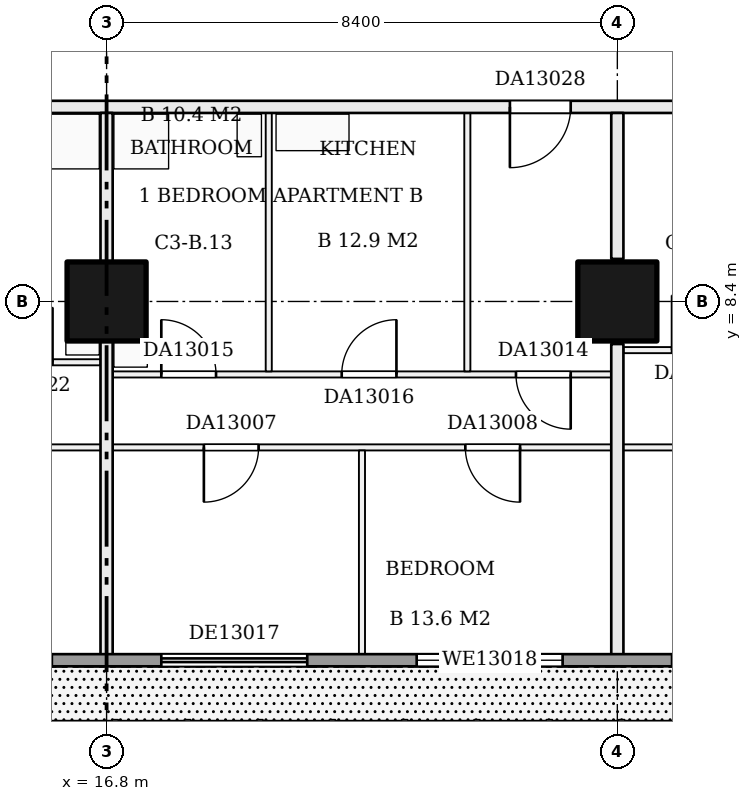
"""IFC4 building model, lengths in metres.
Left out: names, types, materials, properties, quantities, classifications, styles, units other than length and angle.
Written with IfcOpenShell. Run it as: python <this file> out.ifc"""

import sys

from ifc_helpers import new_model, si_unit, direction, frame, frame_2d, origin, origin_2d, place, context, subcontext, project, spatial, rectangle, extrude, element, fill, save


model = new_model("IFC4")
c1 = context("Model", 3, precision=1e-05, world=origin(), true_north=direction((0.0, 1.0)))
c2 = subcontext(c1, "Body", "Model", "MODEL_VIEW")
j1 = project(units=[si_unit("LENGTHUNIT", "METRE"), si_unit("PLANEANGLEUNIT", "RADIAN")], contexts=[c1])
p1 = place(None, origin())
s1 = spatial("IfcSite", under=j1, at=p1, CompositionType="ELEMENT")
p2 = place(p1, origin())
s2 = spatial("IfcBuilding", under=s1, at=p2, CompositionType="ELEMENT")
p3 = place(p2, frame((0.0, 0.0, 56.7)))
s3 = spatial("IfcBuildingStorey", under=s2, at=p3, CompositionType="ELEMENT", Elevation=56.7)
for number, where, z_axis, x_axis in (
    (1, (16.8, 8.4, 0.0), (0.0, 0.0, 1.0), (1.0, 0.0, 0.0)),
    (2, (25.2, 8.4, 0.0), (0.0, 0.0, 1.0), (1.0, 0.0, 0.0)),
):
    element("IfcColumn", number, at=place(p3, frame(where, z_axis=z_axis, x_axis=x_axis)), inside=s3, PredefinedType="COLUMN", context=c2, shape_type="SweptSolid", body=[
        extrude(rectangle(XDim=1.3, YDim=1.3, at=origin_2d()), origin(), (0.0, 0.0, 1.0), 3.22),
    ])
p4 = place(p3, frame((8.45, 6.0, 0.0), z_axis=(0.0, 0.0, 1.0), x_axis=(1.0, 0.0, 0.0)))
e3 = element("IfcWall", 3, at=p4, inside=s3, PredefinedType="PARTITIONING", context=c2, shape_type="SweptSolid", body=[
    extrude(rectangle(XDim=29.25, YDim=0.1, at=frame_2d((14.625, 0.0))), origin(), (0.0, 0.0, 1.0), 3.22),
])
p5 = place(p4, frame((3.75, 0.0, 0.0)))
e4 = element("IfcOpeningElement", 4, at=p5, cuts=e3, PredefinedType="OPENING", context=c2, shape_type="SweptSolid", body=[
    extrude(rectangle(XDim=0.9, YDim=2.1, at=frame_2d((0.45, 1.05))), frame((0.0, 0.06, 0.0), z_axis=(0.0, -1.0, 0.0), x_axis=(1.0, 0.0, 0.0)), (0.0, 0.0, 1.0), 0.12),
])
p6 = place(p4, frame((9.95, 0.0, 0.0)))
e5 = element("IfcOpeningElement", 5, at=p6, cuts=e3, PredefinedType="OPENING", context=c2, shape_type="SweptSolid", body=[
    extrude(rectangle(XDim=0.9, YDim=2.1, at=frame_2d((0.45, 1.05))), frame((0.0, 0.06, 0.0), z_axis=(0.0, -1.0, 0.0), x_axis=(1.0, 0.0, 0.0)), (0.0, 0.0, 1.0), 0.12),
])
p7 = place(p4, frame((14.25, 0.0, 0.0)))
e6 = element("IfcOpeningElement", 6, at=p7, cuts=e3, PredefinedType="OPENING", context=c2, shape_type="SweptSolid", body=[
    extrude(rectangle(XDim=0.9, YDim=2.1, at=frame_2d((0.45, 1.05))), frame((0.0, 0.06, 0.0), z_axis=(0.0, -1.0, 0.0), x_axis=(1.0, 0.0, 0.0)), (0.0, 0.0, 1.0), 0.12),
])
p8 = place(p4, frame((20.45, 0.0, 0.0)))
e7 = element("IfcOpeningElement", 7, at=p8, cuts=e3, PredefinedType="OPENING", context=c2, shape_type="SweptSolid", body=[
    extrude(rectangle(XDim=0.9, YDim=2.1, at=frame_2d((0.45, 1.05))), frame((0.0, 0.06, 0.0), z_axis=(0.0, -1.0, 0.0), x_axis=(1.0, 0.0, 0.0)), (0.0, 0.0, 1.0), 0.12),
])
p9 = place(p4, frame((26.75, 0.0, 0.0)))
e8 = element("IfcOpeningElement", 8, at=p9, cuts=e3, PredefinedType="OPENING", context=c2, shape_type="SweptSolid", body=[
    extrude(rectangle(XDim=0.9, YDim=2.1, at=frame_2d((0.45, 1.05))), frame((0.0, 0.06, 0.0), z_axis=(0.0, -1.0, 0.0), x_axis=(1.0, 0.0, 0.0)), (0.0, 0.0, 1.0), 0.12),
])
p10 = place(p3, frame((16.9, 7.2, 0.0), z_axis=(0.0, 0.0, 1.0), x_axis=(1.0, 0.0, 0.0)))
e9 = element("IfcWall", 9, at=p10, inside=s3, PredefinedType="PARTITIONING", context=c2, shape_type="SweptSolid", body=[
    extrude(rectangle(XDim=8.2, YDim=0.1, at=frame_2d((4.1, 0.0))), origin(), (0.0, 0.0, 1.0), 3.22),
])
p11 = place(p10, frame((6.633, 0.0, 0.0)))
e10 = element("IfcOpeningElement", 10, at=p11, cuts=e9, PredefinedType="OPENING", context=c2, shape_type="SweptSolid", body=[
    extrude(rectangle(XDim=0.9, YDim=2.1, at=frame_2d((0.45, 1.05))), frame((0.0, 0.06, 0.0), z_axis=(0.0, -1.0, 0.0), x_axis=(1.0, 0.0, 0.0)), (0.0, 0.0, 1.0), 0.12),
])
p12 = place(p10, frame((0.8, 0.0, 0.0)))
e11 = element("IfcOpeningElement", 11, at=p12, cuts=e9, PredefinedType="OPENING", context=c2, shape_type="SweptSolid", body=[
    extrude(rectangle(XDim=0.9, YDim=2.1, at=frame_2d((0.45, 1.05))), frame((0.0, 0.06, 0.0), z_axis=(0.0, -1.0, 0.0), x_axis=(1.0, 0.0, 0.0)), (0.0, 0.0, 1.0), 0.12),
])
p13 = place(p10, frame((3.767, 0.0, 0.0)))
e12 = element("IfcOpeningElement", 12, at=p13, cuts=e9, PredefinedType="OPENING", context=c2, shape_type="SweptSolid", body=[
    extrude(rectangle(XDim=0.9, YDim=2.1, at=frame_2d((0.45, 1.05))), frame((0.0, 0.06, 0.0), z_axis=(0.0, -1.0, 0.0), x_axis=(1.0, 0.0, 0.0)), (0.0, 0.0, 1.0), 0.12),
])
p14 = place(p3, frame((8.45, 7.4, 0.0), z_axis=(0.0, 0.0, 1.0), x_axis=(1.0, 0.0, 0.0)))
e13 = element("IfcWall", 13, at=p14, inside=s3, PredefinedType="PARTITIONING", context=c2, shape_type="SweptSolid", body=[
    extrude(rectangle(XDim=8.25, YDim=0.1, at=frame_2d((4.125, 0.0))), origin(), (0.0, 0.0, 1.0), 3.22),
])
p15 = place(p14, frame((4.776, 0.0, 0.0)))
e14 = element("IfcOpeningElement", 14, at=p15, cuts=e13, PredefinedType="OPENING", context=c2, shape_type="SweptSolid", body=[
    extrude(rectangle(XDim=0.9, YDim=2.1, at=frame_2d((0.45, 1.05))), frame((0.0, 0.06, 0.0), z_axis=(0.0, -1.0, 0.0), x_axis=(1.0, 0.0, 0.0)), (0.0, 0.0, 1.0), 0.12),
])
p16 = place(p14, frame((0.85, 0.0, 0.0)))
e15 = element("IfcOpeningElement", 15, at=p16, cuts=e13, PredefinedType="OPENING", context=c2, shape_type="SweptSolid", body=[
    extrude(rectangle(XDim=0.9, YDim=2.1, at=frame_2d((0.45, 1.05))), frame((0.0, 0.06, 0.0), z_axis=(0.0, -1.0, 0.0), x_axis=(1.0, 0.0, 0.0)), (0.0, 0.0, 1.0), 0.12),
])
p17 = place(p14, frame((3.034, 0.0, 0.0)))
e16 = element("IfcOpeningElement", 16, at=p17, cuts=e13, PredefinedType="OPENING", context=c2, shape_type="SweptSolid", body=[
    extrude(rectangle(XDim=0.9, YDim=2.1, at=frame_2d((0.45, 1.05))), frame((0.0, 0.06, 0.0), z_axis=(0.0, -1.0, 0.0), x_axis=(1.0, 0.0, 0.0)), (0.0, 0.0, 1.0), 0.12),
])
p18 = place(p14, frame((6.561, 0.0, 0.0)))
e17 = element("IfcOpeningElement", 17, at=p18, cuts=e13, PredefinedType="OPENING", context=c2, shape_type="SweptSolid", body=[
    extrude(rectangle(XDim=0.9, YDim=2.1, at=frame_2d((0.45, 1.05))), frame((0.0, 0.06, 0.0), z_axis=(0.0, -1.0, 0.0), x_axis=(1.0, 0.0, 0.0)), (0.0, 0.0, 1.0), 0.12),
])
p19 = place(p3, frame((25.3, 7.6, 0.0), z_axis=(0.0, 0.0, 1.0), x_axis=(1.0, 0.0, 0.0)))
e18 = element("IfcWall", 18, at=p19, inside=s3, PredefinedType="PARTITIONING", context=c2, shape_type="SweptSolid", body=[
    extrude(rectangle(XDim=12.4, YDim=0.1, at=frame_2d((6.2, 0.0))), origin(), (0.0, 0.0, 1.0), 3.22),
])
p20 = place(p19, frame((3.6, 0.0, 0.0)))
e19 = element("IfcOpeningElement", 19, at=p20, cuts=e18, PredefinedType="OPENING", context=c2, shape_type="SweptSolid", body=[
    extrude(rectangle(XDim=0.9, YDim=2.1, at=frame_2d((0.45, 1.05))), frame((0.0, 0.06, 0.0), z_axis=(0.0, -1.0, 0.0), x_axis=(1.0, 0.0, 0.0)), (0.0, 0.0, 1.0), 0.12),
])
p21 = place(p19, frame((0.8, 0.0, 0.0)))
e20 = element("IfcOpeningElement", 20, at=p21, cuts=e18, PredefinedType="OPENING", context=c2, shape_type="SweptSolid", body=[
    extrude(rectangle(XDim=0.9, YDim=2.1, at=frame_2d((0.45, 1.05))), frame((0.0, 0.06, 0.0), z_axis=(0.0, -1.0, 0.0), x_axis=(1.0, 0.0, 0.0)), (0.0, 0.0, 1.0), 0.12),
])
p22 = place(p19, frame((6.5, 0.0, 0.0)))
e21 = element("IfcOpeningElement", 21, at=p22, cuts=e18, PredefinedType="OPENING", context=c2, shape_type="SweptSolid", body=[
    extrude(rectangle(XDim=0.9, YDim=2.1, at=frame_2d((0.45, 1.05))), frame((0.0, 0.06, 0.0), z_axis=(0.0, -1.0, 0.0), x_axis=(1.0, 0.0, 0.0)), (0.0, 0.0, 1.0), 0.12),
])
p23 = place(p19, frame((10.1, 0.0, 0.0)))
e22 = element("IfcOpeningElement", 22, at=p23, cuts=e18, PredefinedType="OPENING", context=c2, shape_type="SweptSolid", body=[
    extrude(rectangle(XDim=0.9, YDim=2.1, at=frame_2d((0.45, 1.05))), frame((0.0, 0.06, 0.0), z_axis=(0.0, -1.0, 0.0), x_axis=(1.0, 0.0, 0.0)), (0.0, 0.0, 1.0), 0.12),
])
p24 = place(p3, frame((11.5, 11.6, 0.0), z_axis=(0.0, 0.0, 1.0), x_axis=(1.0, 0.0, 0.0)))
e23 = element("IfcWall", 23, at=p24, inside=s3, PredefinedType="PARTITIONING", context=c2, shape_type="SweptSolid", body=[
    extrude(rectangle(XDim=30.5, YDim=0.2, at=frame_2d((15.25, 0.0))), origin(), (0.0, 0.0, 1.0), 3.22),
])
p25 = place(p24, frame((1.626, 0.0, 0.0)))
e24 = element("IfcOpeningElement", 24, at=p25, cuts=e23, PredefinedType="OPENING", context=c2, shape_type="SweptSolid", body=[
    extrude(rectangle(XDim=1.0, YDim=2.1, at=frame_2d((0.5, 1.05))), frame((0.0, 0.11, 0.0), z_axis=(0.0, -1.0, 0.0), x_axis=(1.0, 0.0, 0.0)), (0.0, 0.0, 1.0), 0.22),
])
p26 = place(p24, frame((11.933, 0.0, 0.0)))
e25 = element("IfcOpeningElement", 25, at=p26, cuts=e23, PredefinedType="OPENING", context=c2, shape_type="SweptSolid", body=[
    extrude(rectangle(XDim=1.0, YDim=2.1, at=frame_2d((0.5, 1.05))), frame((0.0, 0.11, 0.0), z_axis=(0.0, -1.0, 0.0), x_axis=(1.0, 0.0, 0.0)), (0.0, 0.0, 1.0), 0.22),
])
p27 = place(p24, frame((17.3, 0.0, 0.0)))
e26 = element("IfcOpeningElement", 26, at=p27, cuts=e23, PredefinedType="OPENING", context=c2, shape_type="SweptSolid", body=[
    extrude(rectangle(XDim=1.0, YDim=2.1, at=frame_2d((0.5, 1.05))), frame((0.0, 0.11, 0.0), z_axis=(0.0, -1.0, 0.0), x_axis=(1.0, 0.0, 0.0)), (0.0, 0.0, 1.0), 0.22),
])
p28 = place(p24, frame((26.8, 0.0, 0.0)))
e27 = element("IfcOpeningElement", 27, at=p28, cuts=e23, PredefinedType="OPENING", context=c2, shape_type="SweptSolid", body=[
    extrude(rectangle(XDim=1.0, YDim=2.1, at=frame_2d((0.5, 1.05))), frame((0.0, 0.11, 0.0), z_axis=(0.0, -1.0, 0.0), x_axis=(1.0, 0.0, 0.0)), (0.0, 0.0, 1.0), 0.22),
])
p29 = place(p3, frame((16.8, 2.5, 0.0), z_axis=(0.0, 0.0, 1.0), x_axis=(0.0, 1.0, 0.0)))
e28 = element("IfcWall", 28, at=p29, inside=s3, PredefinedType="PARTITIONING", context=c2, shape_type="SweptSolid", body=[
    extrude(rectangle(XDim=9.0, YDim=0.2, at=frame_2d((4.5, 0.0))), origin(), (0.0, 0.0, 1.0), 3.22),
])
p30 = place(p3, frame((19.467, 7.25, 0.0), z_axis=(0.0, 0.0, 1.0), x_axis=(0.0, 1.0, 0.0)))
e29 = element("IfcWall", 29, at=p30, inside=s3, PredefinedType="PARTITIONING", context=c2, shape_type="SweptSolid", body=[
    extrude(rectangle(XDim=4.25, YDim=0.1, at=frame_2d((2.125, 0.0))), origin(), (0.0, 0.0, 1.0), 3.22),
])
p31 = place(p3, frame((21.0, 2.5, 0.0), z_axis=(0.0, 0.0, 1.0), x_axis=(0.0, 1.0, 0.0)))
e30 = element("IfcWall", 30, at=p31, inside=s3, PredefinedType="PARTITIONING", context=c2, shape_type="SweptSolid", body=[
    extrude(rectangle(XDim=3.45, YDim=0.1, at=frame_2d((1.725, 0.0))), origin(), (0.0, 0.0, 1.0), 3.22),
])
p32 = place(p3, frame((22.733, 7.25, 0.0), z_axis=(0.0, 0.0, 1.0), x_axis=(0.0, 1.0, 0.0)))
e31 = element("IfcWall", 31, at=p32, inside=s3, PredefinedType="PARTITIONING", context=c2, shape_type="SweptSolid", body=[
    extrude(rectangle(XDim=4.25, YDim=0.1, at=frame_2d((2.125, 0.0))), origin(), (0.0, 0.0, 1.0), 3.22),
])
p33 = place(p3, frame((25.2, 2.5, 0.0), z_axis=(0.0, 0.0, 1.0), x_axis=(0.0, 1.0, 0.0)))
e32 = element("IfcWall", 32, at=p33, inside=s3, PredefinedType="PARTITIONING", context=c2, shape_type="SweptSolid", body=[
    extrude(rectangle(XDim=5.2, YDim=0.2, at=frame_2d((2.6, 0.0))), origin(), (0.0, 0.0, 1.0), 3.22),
])
p34 = place(p3, frame((25.2, 9.1, 0.0), z_axis=(0.0, 0.0, 1.0), x_axis=(0.0, 1.0, 0.0)))
e33 = element("IfcWall", 33, at=p34, inside=s3, PredefinedType="PARTITIONING", context=c2, shape_type="SweptSolid", body=[
    extrude(rectangle(XDim=2.4, YDim=0.2, at=frame_2d((1.2, 0.0))), origin(), (0.0, 0.0, 1.0), 3.22),
])
p35 = place(p3, frame((4.8, 2.5, 0.0), z_axis=(0.0, 0.0, 1.0), x_axis=(1.0, 0.0, 0.0)))
e34 = element("IfcWall", 34, at=p35, inside=s3, PredefinedType="SOLIDWALL", context=c2, shape_type="SweptSolid", body=[
    extrude(rectangle(XDim=57.6, YDim=0.2, at=frame_2d((28.8, 0.0))), origin(), (0.0, 0.0, 1.0), 3.22),
])
p36 = place(p35, frame((0.3, 0.0, 0.0)))
e35 = element("IfcOpeningElement", 35, at=p36, cuts=e34, PredefinedType="OPENING", context=c2, shape_type="SweptSolid", body=[
    extrude(rectangle(XDim=2.4, YDim=2.2, at=frame_2d((1.2, 1.1))), frame((0.0, 0.11, 0.0), z_axis=(0.0, -1.0, 0.0), x_axis=(1.0, 0.0, 0.0)), (0.0, 0.0, 1.0), 0.22),
])
p37 = place(p35, frame((4.5, 0.0, 0.0)))
e36 = element("IfcOpeningElement", 36, at=p37, cuts=e34, PredefinedType="OPENING", context=c2, shape_type="SweptSolid", body=[
    extrude(rectangle(XDim=2.4, YDim=2.2, at=frame_2d((1.2, 1.1))), frame((0.0, 0.11, 0.0), z_axis=(0.0, -1.0, 0.0), x_axis=(1.0, 0.0, 0.0)), (0.0, 0.0, 1.0), 0.22),
])
p38 = place(p35, frame((8.7, 0.0, 0.0)))
e37 = element("IfcOpeningElement", 37, at=p38, cuts=e34, PredefinedType="OPENING", context=c2, shape_type="SweptSolid", body=[
    extrude(rectangle(XDim=2.4, YDim=2.2, at=frame_2d((1.2, 1.1))), frame((0.0, 0.11, 0.0), z_axis=(0.0, -1.0, 0.0), x_axis=(1.0, 0.0, 0.0)), (0.0, 0.0, 1.0), 0.22),
])
p39 = place(p35, frame((12.9, 0.0, 0.0)))
e38 = element("IfcOpeningElement", 38, at=p39, cuts=e34, PredefinedType="OPENING", context=c2, shape_type="SweptSolid", body=[
    extrude(rectangle(XDim=2.4, YDim=2.2, at=frame_2d((1.2, 1.1))), frame((0.0, 0.11, 0.0), z_axis=(0.0, -1.0, 0.0), x_axis=(1.0, 0.0, 0.0)), (0.0, 0.0, 1.0), 0.22),
])
p40 = place(p35, frame((17.1, 0.0, 0.9)))
e39 = element("IfcOpeningElement", 39, at=p40, cuts=e34, PredefinedType="OPENING", context=c2, shape_type="SweptSolid", body=[
    extrude(rectangle(XDim=2.4, YDim=1.5, at=frame_2d((1.2, 0.75))), frame((0.0, 0.11, 0.0), z_axis=(0.0, -1.0, 0.0), x_axis=(1.0, 0.0, 0.0)), (0.0, 0.0, 1.0), 0.22),
])
p41 = place(p35, frame((21.3, 0.0, 0.0)))
e40 = element("IfcOpeningElement", 40, at=p41, cuts=e34, PredefinedType="OPENING", context=c2, shape_type="SweptSolid", body=[
    extrude(rectangle(XDim=2.4, YDim=2.2, at=frame_2d((1.2, 1.1))), frame((0.0, 0.11, 0.0), z_axis=(0.0, -1.0, 0.0), x_axis=(1.0, 0.0, 0.0)), (0.0, 0.0, 1.0), 0.22),
])
p42 = place(p35, frame((25.5, 0.0, 0.0)))
e41 = element("IfcOpeningElement", 41, at=p42, cuts=e34, PredefinedType="OPENING", context=c2, shape_type="SweptSolid", body=[
    extrude(rectangle(XDim=2.4, YDim=2.2, at=frame_2d((1.2, 1.1))), frame((0.0, 0.11, 0.0), z_axis=(0.0, -1.0, 0.0), x_axis=(1.0, 0.0, 0.0)), (0.0, 0.0, 1.0), 0.22),
])
p43 = place(p35, frame((29.7, 0.0, 0.9)))
e42 = element("IfcOpeningElement", 42, at=p43, cuts=e34, PredefinedType="OPENING", context=c2, shape_type="SweptSolid", body=[
    extrude(rectangle(XDim=2.4, YDim=1.5, at=frame_2d((1.2, 0.75))), frame((0.0, 0.11, 0.0), z_axis=(0.0, -1.0, 0.0), x_axis=(1.0, 0.0, 0.0)), (0.0, 0.0, 1.0), 0.22),
])
p44 = place(p35, frame((33.9, 0.0, 0.0)))
e43 = element("IfcOpeningElement", 43, at=p44, cuts=e34, PredefinedType="OPENING", context=c2, shape_type="SweptSolid", body=[
    extrude(rectangle(XDim=2.4, YDim=2.2, at=frame_2d((1.2, 1.1))), frame((0.0, 0.11, 0.0), z_axis=(0.0, -1.0, 0.0), x_axis=(1.0, 0.0, 0.0)), (0.0, 0.0, 1.0), 0.22),
])
p45 = place(p35, frame((38.1, 0.0, 0.0)))
e44 = element("IfcOpeningElement", 44, at=p45, cuts=e34, PredefinedType="OPENING", context=c2, shape_type="SweptSolid", body=[
    extrude(rectangle(XDim=2.4, YDim=2.2, at=frame_2d((1.2, 1.1))), frame((0.0, 0.11, 0.0), z_axis=(0.0, -1.0, 0.0), x_axis=(1.0, 0.0, 0.0)), (0.0, 0.0, 1.0), 0.22),
])
p46 = place(p35, frame((42.3, 0.0, 0.9)))
e45 = element("IfcOpeningElement", 45, at=p46, cuts=e34, PredefinedType="OPENING", context=c2, shape_type="SweptSolid", body=[
    extrude(rectangle(XDim=2.4, YDim=1.5, at=frame_2d((1.2, 0.75))), frame((0.0, 0.11, 0.0), z_axis=(0.0, -1.0, 0.0), x_axis=(1.0, 0.0, 0.0)), (0.0, 0.0, 1.0), 0.22),
])
p47 = place(p35, frame((46.5, 0.0, 0.0)))
e46 = element("IfcOpeningElement", 46, at=p47, cuts=e34, PredefinedType="OPENING", context=c2, shape_type="SweptSolid", body=[
    extrude(rectangle(XDim=2.4, YDim=2.2, at=frame_2d((1.2, 1.1))), frame((0.0, 0.11, 0.0), z_axis=(0.0, -1.0, 0.0), x_axis=(1.0, 0.0, 0.0)), (0.0, 0.0, 1.0), 0.22),
])
p48 = place(p35, frame((50.7, 0.0, 0.9)))
e47 = element("IfcOpeningElement", 47, at=p48, cuts=e34, PredefinedType="OPENING", context=c2, shape_type="SweptSolid", body=[
    extrude(rectangle(XDim=2.4, YDim=1.5, at=frame_2d((1.2, 0.75))), frame((0.0, 0.11, 0.0), z_axis=(0.0, -1.0, 0.0), x_axis=(1.0, 0.0, 0.0)), (0.0, 0.0, 1.0), 0.22),
])
p49 = place(p35, frame((54.9, 0.0, 0.9)))
e48 = element("IfcOpeningElement", 48, at=p49, cuts=e34, PredefinedType="OPENING", context=c2, shape_type="SweptSolid", body=[
    extrude(rectangle(XDim=2.4, YDim=1.5, at=frame_2d((1.2, 0.75))), frame((0.0, 0.11, 0.0), z_axis=(0.0, -1.0, 0.0), x_axis=(1.0, 0.0, 0.0)), (0.0, 0.0, 1.0), 0.22),
])
p50 = place(p6, frame((0.9, 0.0, 0.0), z_axis=(0.0, 0.0, 1.0), x_axis=(-1.0, 0.0, 0.0)))
e49 = element("IfcDoor", 49, at=p50, inside=s3, OperationType="SINGLE_SWING_RIGHT", PredefinedType="DOOR", context=c2, shape_type="SweptSolid", body=[
    extrude(rectangle(XDim=0.9, YDim=2.1, at=frame_2d((0.45, 1.05))), frame((0.0, 0.025, 0.0), z_axis=(0.0, -1.0, 0.0), x_axis=(1.0, 0.0, 0.0)), (0.0, 0.0, 1.0), 0.05),
])
fill(e5, e49)
p51 = place(p7, frame((0.9, 0.0, 0.0), z_axis=(0.0, 0.0, 1.0), x_axis=(-1.0, 0.0, 0.0)))
e50 = element("IfcDoor", 50, at=p51, inside=s3, OperationType="SINGLE_SWING_LEFT", PredefinedType="DOOR", context=c2, shape_type="SweptSolid", body=[
    extrude(rectangle(XDim=0.9, YDim=2.1, at=frame_2d((0.45, 1.05))), frame((0.0, 0.025, 0.0), z_axis=(0.0, -1.0, 0.0), x_axis=(1.0, 0.0, 0.0)), (0.0, 0.0, 1.0), 0.05),
])
fill(e6, e50)
p52 = place(p11, frame((0.9, 0.0, 0.0), z_axis=(0.0, 0.0, 1.0), x_axis=(-1.0, 0.0, 0.0)))
e51 = element("IfcDoor", 51, at=p52, inside=s3, OperationType="SINGLE_SWING_LEFT", PredefinedType="DOOR", context=c2, shape_type="SweptSolid", body=[
    extrude(rectangle(XDim=0.9, YDim=2.1, at=frame_2d((0.45, 1.05))), frame((0.0, 0.025, 0.0), z_axis=(0.0, -1.0, 0.0), x_axis=(1.0, 0.0, 0.0)), (0.0, 0.0, 1.0), 0.05),
])
fill(e10, e51)
p53 = place(p12, origin())
e52 = element("IfcDoor", 52, at=p53, inside=s3, OperationType="SINGLE_SWING_LEFT", PredefinedType="DOOR", context=c2, shape_type="SweptSolid", body=[
    extrude(rectangle(XDim=0.9, YDim=2.1, at=frame_2d((0.45, 1.05))), frame((0.0, 0.025, 0.0), z_axis=(0.0, -1.0, 0.0), x_axis=(1.0, 0.0, 0.0)), (0.0, 0.0, 1.0), 0.05),
])
fill(e11, e52)
p54 = place(p13, origin())
e53 = element("IfcDoor", 53, at=p54, inside=s3, OperationType="SINGLE_SWING_RIGHT", PredefinedType="DOOR", context=c2, shape_type="SweptSolid", body=[
    extrude(rectangle(XDim=0.9, YDim=2.1, at=frame_2d((0.45, 1.05))), frame((0.0, 0.025, 0.0), z_axis=(0.0, -1.0, 0.0), x_axis=(1.0, 0.0, 0.0)), (0.0, 0.0, 1.0), 0.05),
])
fill(e12, e53)
p55 = place(p18, origin())
e54 = element("IfcDoor", 54, at=p55, inside=s3, OperationType="SINGLE_SWING_RIGHT", PredefinedType="DOOR", context=c2, shape_type="SweptSolid", body=[
    extrude(rectangle(XDim=0.9, YDim=2.1, at=frame_2d((0.45, 1.05))), frame((0.0, 0.025, 0.0), z_axis=(0.0, -1.0, 0.0), x_axis=(1.0, 0.0, 0.0)), (0.0, 0.0, 1.0), 0.05),
])
fill(e17, e54)
p56 = place(p26, frame((1.0, 0.0, 0.0), z_axis=(0.0, 0.0, 1.0), x_axis=(-1.0, 0.0, 0.0)))
e55 = element("IfcDoor", 55, at=p56, inside=s3, OperationType="SINGLE_SWING_RIGHT", PredefinedType="DOOR", context=c2, shape_type="SweptSolid", body=[
    extrude(rectangle(XDim=1.0, YDim=2.1, at=frame_2d((0.5, 1.05))), frame((0.0, 0.025, 0.0), z_axis=(0.0, -1.0, 0.0), x_axis=(1.0, 0.0, 0.0)), (0.0, 0.0, 1.0), 0.05),
])
fill(e25, e55)
p57 = place(p39, origin())
e56 = element("IfcDoor", 56, at=p57, inside=s3, OperationType="DOUBLE_DOOR_SLIDING", PredefinedType="DOOR", context=c2, shape_type="SweptSolid", body=[
    extrude(rectangle(XDim=2.4, YDim=2.2, at=frame_2d((1.2, 1.1))), frame((0.0, 0.025, 0.0), z_axis=(0.0, -1.0, 0.0), x_axis=(1.0, 0.0, 0.0)), (0.0, 0.0, 1.0), 0.05),
])
fill(e38, e56)
p58 = place(p40, origin())
e57 = element("IfcWindow", 57, at=p58, inside=s3, PartitioningType="SINGLE_PANEL", PredefinedType="WINDOW", context=c2, shape_type="SweptSolid", body=[
    extrude(rectangle(XDim=2.4, YDim=1.5, at=frame_2d((1.2, 0.75))), frame((0.0, 0.03, 0.0), z_axis=(0.0, -1.0, 0.0), x_axis=(1.0, 0.0, 0.0)), (0.0, 0.0, 1.0), 0.06),
])
fill(e39, e57)
save(model, sys.argv[1])
